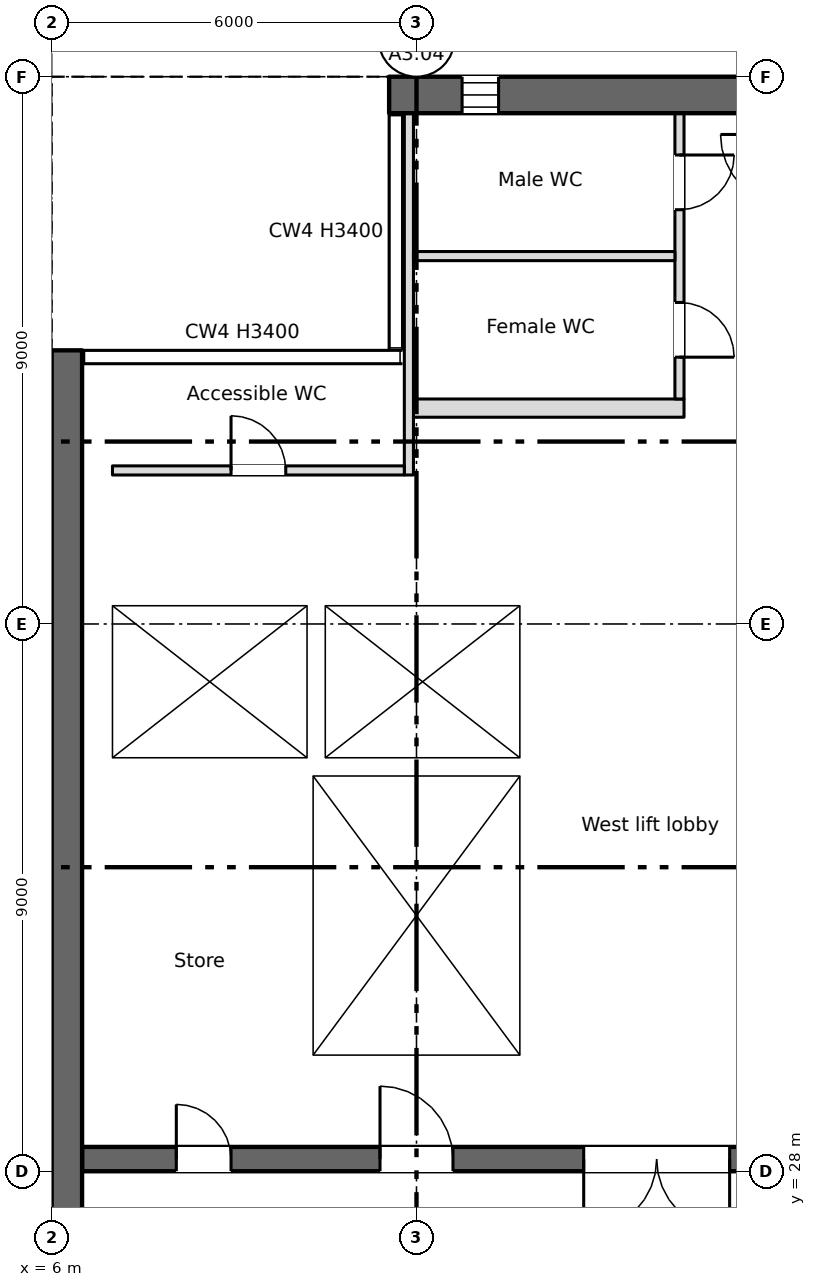
"""IFC4 building model, lengths in metres.
Left out: names, types, materials, properties, quantities, classifications, styles, units other than length and angle.
Written with IfcOpenShell. Run it as: python <this file> out.ifc"""

import sys

from ifc_helpers import new_model, si_unit, direction, frame, frame_2d, origin, place, context, subcontext, project, spatial, rectangle, extrude, element, fill, save


model = new_model("IFC4")
c1 = context("Model", 3, precision=1e-05, world=origin(), true_north=direction((0.0, 1.0)))
c2 = subcontext(c1, "Body", "Model", "MODEL_VIEW")
j1 = project(units=[si_unit("LENGTHUNIT", "METRE"), si_unit("PLANEANGLEUNIT", "RADIAN")], contexts=[c1])
p1 = place(None, origin())
s1 = spatial("IfcSite", under=j1, at=p1, CompositionType="ELEMENT")
p2 = place(p1, origin())
s2 = spatial("IfcBuilding", under=s1, at=p2, CompositionType="ELEMENT")
p3 = place(p2, frame((0.0, 0.0, 243.15)))
s3 = spatial("IfcBuildingStorey", under=s2, at=p3, CompositionType="ELEMENT", Elevation=243.15)
p4 = place(p3, frame((6.25, 8.5, 0.0), z_axis=(0.0, 0.0, 1.0), x_axis=(0.0, 1.0, 0.0)))
e1 = element("IfcWall", 1, at=p4, inside=s3, PredefinedType="SHEAR", context=c2, shape_type="SweptSolid", body=[
    extrude(rectangle(XDim=33.0, YDim=0.5, at=frame_2d((16.5, 0.0))), origin(), (0.0, 0.0, 1.0), 3.4),
])
p5 = place(p4, frame((1.2, 0.0, 0.6)))
e2 = element("IfcOpeningElement", 2, at=p5, cuts=e1, PredefinedType="OPENING", context=c2, shape_type="SweptSolid", body=[
    extrude(rectangle(XDim=0.6, YDim=2.4, at=frame_2d((0.3, 1.2))), frame((0.0, 0.26, 0.0), z_axis=(0.0, -1.0, 0.0), x_axis=(1.0, 0.0, 0.0)), (0.0, 0.0, 1.0), 0.52),
])
p6 = place(p4, frame((7.2, 0.0, 0.6)))
e3 = element("IfcOpeningElement", 3, at=p6, cuts=e1, PredefinedType="OPENING", context=c2, shape_type="SweptSolid", body=[
    extrude(rectangle(XDim=0.6, YDim=2.4, at=frame_2d((0.3, 1.2))), frame((0.0, 0.26, 0.0), z_axis=(0.0, -1.0, 0.0), x_axis=(1.0, 0.0, 0.0)), (0.0, 0.0, 1.0), 0.52),
])
p7 = place(p4, frame((13.2, 0.0, 0.6)))
e4 = element("IfcOpeningElement", 4, at=p7, cuts=e1, PredefinedType="OPENING", context=c2, shape_type="SweptSolid", body=[
    extrude(rectangle(XDim=0.6, YDim=2.4, at=frame_2d((0.3, 1.2))), frame((0.0, 0.26, 0.0), z_axis=(0.0, -1.0, 0.0), x_axis=(1.0, 0.0, 0.0)), (0.0, 0.0, 1.0), 0.52),
])
p8 = place(p3, frame((11.55, 45.7, 0.0), z_axis=(0.0, 0.0, 1.0), x_axis=(1.0, 0.0, 0.0)))
e5 = element("IfcWall", 5, at=p8, inside=s3, PredefinedType="SHEAR", context=c2, shape_type="SweptSolid", body=[
    extrude(rectangle(XDim=48.9, YDim=0.6, at=frame_2d((24.45, 0.0))), origin(), (0.0, 0.0, 1.0), 3.4),
])
p9 = place(p8, frame((1.2, 0.0, 0.6)))
e6 = element("IfcOpeningElement", 6, at=p9, cuts=e5, PredefinedType="OPENING", context=c2, shape_type="SweptSolid", body=[
    extrude(rectangle(XDim=0.6, YDim=2.4, at=frame_2d((0.3, 1.2))), frame((0.0, 0.31, 0.0), z_axis=(0.0, -1.0, 0.0), x_axis=(1.0, 0.0, 0.0)), (0.0, 0.0, 1.0), 0.62),
])
p10 = place(p3, frame((6.5, 28.2, 0.0), z_axis=(0.0, 0.0, 1.0), x_axis=(1.0, 0.0, 0.0)))
e7 = element("IfcWall", 7, at=p10, inside=s3, PredefinedType="SHEAR", context=c2, shape_type="SweptSolid", body=[
    extrude(rectangle(XDim=58.0, YDim=0.4, at=frame_2d((29.0, 0.0))), origin(), (0.0, 0.0, 1.0), 3.4),
])
p11 = place(p10, frame((14.05, 0.0, 0.0)))
e8 = element("IfcOpeningElement", 8, at=p11, cuts=e7, PredefinedType="OPENING", context=c2, shape_type="SweptSolid", body=[
    extrude(rectangle(XDim=0.9, YDim=2.1, at=frame_2d((0.45, 1.05))), frame((0.0, 0.21, 0.0), z_axis=(0.0, -1.0, 0.0), x_axis=(1.0, 0.0, 0.0)), (0.0, 0.0, 1.0), 0.42),
])
p12 = place(p10, frame((48.762, 0.0, 0.0)))
e9 = element("IfcOpeningElement", 9, at=p12, cuts=e7, PredefinedType="OPENING", context=c2, shape_type="SweptSolid", body=[
    extrude(rectangle(XDim=0.9, YDim=2.1, at=frame_2d((0.45, 1.05))), frame((0.0, 0.21, 0.0), z_axis=(0.0, -1.0, 0.0), x_axis=(1.0, 0.0, 0.0)), (0.0, 0.0, 1.0), 0.42),
])
p13 = place(p10, frame((51.337, 0.0, 0.0)))
e10 = element("IfcOpeningElement", 10, at=p13, cuts=e7, PredefinedType="OPENING", context=c2, shape_type="SweptSolid", body=[
    extrude(rectangle(XDim=0.9, YDim=2.1, at=frame_2d((0.45, 1.05))), frame((0.0, 0.21, 0.0), z_axis=(0.0, -1.0, 0.0), x_axis=(1.0, 0.0, 0.0)), (0.0, 0.0, 1.0), 0.42),
])
p14 = place(p10, frame((1.55, 0.0, 0.0)))
e11 = element("IfcOpeningElement", 11, at=p14, cuts=e7, PredefinedType="OPENING", context=c2, shape_type="SweptSolid", body=[
    extrude(rectangle(XDim=0.9, YDim=2.1, at=frame_2d((0.45, 1.05))), frame((0.0, 0.21, 0.0), z_axis=(0.0, -1.0, 0.0), x_axis=(1.0, 0.0, 0.0)), (0.0, 0.0, 1.0), 0.42),
])
p15 = place(p10, frame((4.9, 0.0, 0.0)))
e12 = element("IfcOpeningElement", 12, at=p15, cuts=e7, PredefinedType="OPENING", context=c2, shape_type="SweptSolid", body=[
    extrude(rectangle(XDim=1.2, YDim=2.1, at=frame_2d((0.6, 1.05))), frame((0.0, 0.21, 0.0), z_axis=(0.0, -1.0, 0.0), x_axis=(1.0, 0.0, 0.0)), (0.0, 0.0, 1.0), 0.42),
])
p16 = place(p10, frame((31.9, 0.0, 0.0)))
e13 = element("IfcOpeningElement", 13, at=p16, cuts=e7, PredefinedType="OPENING", context=c2, shape_type="SweptSolid", body=[
    extrude(rectangle(XDim=1.2, YDim=2.1, at=frame_2d((0.6, 1.05))), frame((0.0, 0.21, 0.0), z_axis=(0.0, -1.0, 0.0), x_axis=(1.0, 0.0, 0.0)), (0.0, 0.0, 1.0), 0.42),
])
p17 = place(p10, frame((55.4, 0.0, 0.0)))
e14 = element("IfcOpeningElement", 14, at=p17, cuts=e7, PredefinedType="OPENING", context=c2, shape_type="SweptSolid", body=[
    extrude(rectangle(XDim=1.2, YDim=2.1, at=frame_2d((0.6, 1.05))), frame((0.0, 0.21, 0.0), z_axis=(0.0, -1.0, 0.0), x_axis=(1.0, 0.0, 0.0)), (0.0, 0.0, 1.0), 0.42),
])
p18 = place(p10, frame((21.9, 0.0, 0.0)))
e15 = element("IfcOpeningElement", 15, at=p18, cuts=e7, PredefinedType="OPENING", context=c2, shape_type="SweptSolid", body=[
    extrude(rectangle(XDim=1.2, YDim=2.1, at=frame_2d((0.6, 1.05))), frame((0.0, 0.21, 0.0), z_axis=(0.0, -1.0, 0.0), x_axis=(1.0, 0.0, 0.0)), (0.0, 0.0, 1.0), 0.42),
])
p19 = place(p10, frame((41.9, 0.0, 0.0)))
e16 = element("IfcOpeningElement", 16, at=p19, cuts=e7, PredefinedType="OPENING", context=c2, shape_type="SweptSolid", body=[
    extrude(rectangle(XDim=1.2, YDim=2.1, at=frame_2d((0.6, 1.05))), frame((0.0, 0.21, 0.0), z_axis=(0.0, -1.0, 0.0), x_axis=(1.0, 0.0, 0.0)), (0.0, 0.0, 1.0), 0.42),
])
p20 = place(p10, frame((25.05, 0.0, 0.0)))
e17 = element("IfcOpeningElement", 17, at=p20, cuts=e7, PredefinedType="OPENING", context=c2, shape_type="SweptSolid", body=[
    extrude(rectangle(XDim=2.4, YDim=2.1, at=frame_2d((1.2, 1.05))), frame((0.0, 0.21, 0.0), z_axis=(0.0, -1.0, 0.0), x_axis=(1.0, 0.0, 0.0)), (0.0, 0.0, 1.0), 0.42),
])
p21 = place(p10, frame((37.55, 0.0, 0.0)))
e18 = element("IfcOpeningElement", 18, at=p21, cuts=e7, PredefinedType="OPENING", context=c2, shape_type="SweptSolid", body=[
    extrude(rectangle(XDim=2.4, YDim=2.1, at=frame_2d((1.2, 1.05))), frame((0.0, 0.21, 0.0), z_axis=(0.0, -1.0, 0.0), x_axis=(1.0, 0.0, 0.0)), (0.0, 0.0, 1.0), 0.42),
])
p22 = place(p10, frame((8.25, 0.0, 0.0)))
e19 = element("IfcOpeningElement", 19, at=p22, cuts=e7, PredefinedType="OPENING", context=c2, shape_type="SweptSolid", body=[
    extrude(rectangle(XDim=2.4, YDim=2.1, at=frame_2d((1.2, 1.05))), frame((0.0, 0.21, 0.0), z_axis=(0.0, -1.0, 0.0), x_axis=(1.0, 0.0, 0.0)), (0.0, 0.0, 1.0), 0.42),
])
p23 = place(p10, frame((29.05, 0.0, 0.0)))
e20 = element("IfcOpeningElement", 20, at=p23, cuts=e7, PredefinedType="OPENING", context=c2, shape_type="SweptSolid", body=[
    extrude(rectangle(XDim=0.9, YDim=2.1, at=frame_2d((0.45, 1.05))), frame((0.0, 0.21, 0.0), z_axis=(0.0, -1.0, 0.0), x_axis=(1.0, 0.0, 0.0)), (0.0, 0.0, 1.0), 0.42),
])
p24 = place(p10, frame((35.05, 0.0, 0.0)))
e21 = element("IfcOpeningElement", 21, at=p24, cuts=e7, PredefinedType="OPENING", context=c2, shape_type="SweptSolid", body=[
    extrude(rectangle(XDim=0.9, YDim=2.1, at=frame_2d((0.45, 1.05))), frame((0.0, 0.21, 0.0), z_axis=(0.0, -1.0, 0.0), x_axis=(1.0, 0.0, 0.0)), (0.0, 0.0, 1.0), 0.42),
])
p25 = place(p3, frame((6.75, 28.4, 0.0), z_axis=(0.0, 0.0, 1.0), x_axis=(0.0, 1.0, 0.0)))
e22 = element("IfcWall", 22, at=p25, inside=s3, PredefinedType="SHEAR", context=c2, shape_type="SweptSolid", body=[
    extrude(rectangle(XDim=12.85, YDim=0.5, at=frame_2d((6.425, 0.0))), origin(), (0.0, 0.0, 1.0), 3.4),
])
for number, where, z_axis, x_axis in (
    (23, (10.15, 28.4, 0.0), (0.0, 0.0, 1.0), (0.0, 1.0, 0.0)),
    (24, (13.85, 28.4, 0.0), (0.0, 0.0, 1.0), (0.0, 1.0, 0.0)),
):
    element("IfcWall", number, at=place(p3, frame(where, z_axis=z_axis, x_axis=x_axis)), inside=s3, PredefinedType="SHEAR", context=c2, shape_type="SweptSolid", body=[
        extrude(rectangle(XDim=6.1, YDim=0.3, at=frame_2d((3.05, 0.0))), origin(), (0.0, 0.0, 1.0), 3.4),
    ])
p26 = place(p3, frame((7.0, 34.65, 0.0), z_axis=(0.0, 0.0, 1.0), x_axis=(1.0, 0.0, 0.0)))
e25 = element("IfcWall", 25, at=p26, inside=s3, PredefinedType="SHEAR", context=c2, shape_type="SweptSolid", body=[
    extrude(rectangle(XDim=7.0, YDim=0.3, at=frame_2d((3.5, 0.0))), origin(), (0.0, 0.0, 1.0), 3.4),
])
p27 = place(p3, frame((7.0, 37.45, 0.0), z_axis=(0.0, 0.0, 1.0), x_axis=(1.0, 0.0, 0.0)))
e26 = element("IfcWall", 26, at=p27, inside=s3, PredefinedType="SHEAR", context=c2, shape_type="SweptSolid", body=[
    extrude(rectangle(XDim=7.0, YDim=0.3, at=frame_2d((3.5, 0.0))), origin(), (0.0, 0.0, 1.0), 3.4),
])
p28 = place(p27, frame((1.05, 0.0, 0.0)))
e27 = element("IfcOpeningElement", 27, at=p28, cuts=e26, PredefinedType="OPENING", context=c2, shape_type="SweptSolid", body=[
    extrude(rectangle(XDim=1.1, YDim=2.1, at=frame_2d((0.55, 1.05))), frame((0.0, 0.16, 0.0), z_axis=(0.0, -1.0, 0.0), x_axis=(1.0, 0.0, 0.0)), (0.0, 0.0, 1.0), 0.32),
])
p29 = place(p27, frame((4.55, 0.0, 0.0)))
e28 = element("IfcOpeningElement", 28, at=p29, cuts=e26, PredefinedType="OPENING", context=c2, shape_type="SweptSolid", body=[
    extrude(rectangle(XDim=1.1, YDim=2.1, at=frame_2d((0.55, 1.05))), frame((0.0, 0.16, 0.0), z_axis=(0.0, -1.0, 0.0), x_axis=(1.0, 0.0, 0.0)), (0.0, 0.0, 1.0), 0.32),
])
p30 = place(p3, frame((13.85, 34.8, 0.0), z_axis=(0.0, 0.0, 1.0), x_axis=(0.0, 1.0, 0.0)))
e29 = element("IfcWall", 29, at=p30, inside=s3, PredefinedType="SHEAR", context=c2, shape_type="SweptSolid", body=[
    extrude(rectangle(XDim=2.5, YDim=0.3, at=frame_2d((1.25, 0.0))), origin(), (0.0, 0.0, 1.0), 3.4),
])
p31 = place(p3, frame((11.95, 40.55, 0.0), z_axis=(0.0, 0.0, 1.0), x_axis=(1.0, 0.0, 0.0)))
e30 = element("IfcWall", 30, at=p31, inside=s3, PredefinedType="PARTITIONING", context=c2, shape_type="SweptSolid", body=[
    extrude(rectangle(XDim=4.45, YDim=0.3, at=frame_2d((2.225, 0.0))), origin(), (0.0, 0.0, 1.0), 3.4),
])
p32 = place(p3, frame((10.35, 34.8, 0.0), z_axis=(0.0, 0.0, 1.0), x_axis=(0.0, 1.0, 0.0)))
e31 = element("IfcWall", 31, at=p32, inside=s3, PredefinedType="SHEAR", context=c2, shape_type="SweptSolid", body=[
    extrude(rectangle(XDim=2.5, YDim=0.3, at=frame_2d((1.25, 0.0))), origin(), (0.0, 0.0, 1.0), 3.4),
])
p33 = place(p3, frame((16.325, 45.4, 0.0), z_axis=(0.0, 0.0, 1.0), x_axis=(0.0, -1.0, 0.0)))
e32 = element("IfcWall", 32, at=p33, inside=s3, PredefinedType="PARTITIONING", context=c2, shape_type="SweptSolid", body=[
    extrude(rectangle(XDim=4.7, YDim=0.15, at=frame_2d((2.35, 0.0))), origin(), (0.0, 0.0, 1.0), 3.4),
])
p34 = place(p33, frame((3.113, 0.0, 0.0)))
e33 = element("IfcOpeningElement", 33, at=p34, cuts=e32, PredefinedType="OPENING", context=c2, shape_type="SweptSolid", body=[
    extrude(rectangle(XDim=0.9, YDim=2.1, at=frame_2d((0.45, 1.05))), frame((0.0, 0.085, 0.0), z_axis=(0.0, -1.0, 0.0), x_axis=(1.0, 0.0, 0.0)), (0.0, 0.0, 1.0), 0.17),
])
p35 = place(p33, frame((0.688, 0.0, 0.0)))
e34 = element("IfcOpeningElement", 34, at=p35, cuts=e32, PredefinedType="OPENING", context=c2, shape_type="SweptSolid", body=[
    extrude(rectangle(XDim=0.9, YDim=2.1, at=frame_2d((0.45, 1.05))), frame((0.0, 0.085, 0.0), z_axis=(0.0, -1.0, 0.0), x_axis=(1.0, 0.0, 0.0)), (0.0, 0.0, 1.0), 0.17),
])
p36 = place(p3, frame((11.875, 39.45, 0.0), z_axis=(0.0, 0.0, 1.0), x_axis=(0.0, 1.0, 0.0)))
e35 = element("IfcWall", 35, at=p36, inside=s3, PredefinedType="PARTITIONING", context=c2, shape_type="SweptSolid", body=[
    extrude(rectangle(XDim=5.95, YDim=0.15, at=frame_2d((2.975, 0.0))), origin(), (0.0, 0.0, 1.0), 3.4),
])
p37 = place(p3, frame((7.0, 39.525, 0.0), z_axis=(0.0, 0.0, 1.0), x_axis=(1.0, 0.0, 0.0)))
e36 = element("IfcWall", 36, at=p37, inside=s3, PredefinedType="PARTITIONING", context=c2, shape_type="SweptSolid", body=[
    extrude(rectangle(XDim=4.8, YDim=0.15, at=frame_2d((2.4, 0.0))), origin(), (0.0, 0.0, 1.0), 3.4),
])
p38 = place(p37, frame((1.95, 0.0, 0.0)))
e37 = element("IfcOpeningElement", 37, at=p38, cuts=e36, PredefinedType="OPENING", context=c2, shape_type="SweptSolid", body=[
    extrude(rectangle(XDim=0.9, YDim=2.1, at=frame_2d((0.45, 1.05))), frame((0.0, 0.085, 0.0), z_axis=(0.0, -1.0, 0.0), x_axis=(1.0, 0.0, 0.0)), (0.0, 0.0, 1.0), 0.17),
])
p39 = place(p3, frame((11.95, 43.05, 0.0), z_axis=(0.0, 0.0, 1.0), x_axis=(1.0, 0.0, 0.0)))
e38 = element("IfcWall", 38, at=p39, inside=s3, PredefinedType="PARTITIONING", context=c2, shape_type="SweptSolid", body=[
    extrude(rectangle(XDim=4.3, YDim=0.15, at=frame_2d((2.15, 0.0))), origin(), (0.0, 0.0, 1.0), 3.4),
])
p40 = place(p9, origin())
e39 = element("IfcWindow", 39, at=p40, inside=s3, PartitioningType="SINGLE_PANEL", PredefinedType="WINDOW", context=c2, shape_type="SweptSolid", body=[
    extrude(rectangle(XDim=0.6, YDim=2.4, at=frame_2d((0.3, 1.2))), frame((0.0, 0.03, 0.0), z_axis=(0.0, -1.0, 0.0), x_axis=(1.0, 0.0, 0.0)), (0.0, 0.0, 1.0), 0.06),
])
fill(e6, e39)
p41 = place(p14, origin())
e40 = element("IfcDoor", 40, at=p41, inside=s3, OperationType="SINGLE_SWING_LEFT", PredefinedType="DOOR", context=c2, shape_type="SweptSolid", body=[
    extrude(rectangle(XDim=0.9, YDim=2.1, at=frame_2d((0.45, 1.05))), frame((0.0, 0.025, 0.0), z_axis=(0.0, -1.0, 0.0), x_axis=(1.0, 0.0, 0.0)), (0.0, 0.0, 1.0), 0.05),
])
fill(e11, e40)
p42 = place(p38, origin())
e41 = element("IfcDoor", 41, at=p42, inside=s3, OperationType="SINGLE_SWING_LEFT", PredefinedType="DOOR", context=c2, shape_type="SweptSolid", body=[
    extrude(rectangle(XDim=0.9, YDim=2.1, at=frame_2d((0.45, 1.05))), frame((0.0, 0.025, 0.0), z_axis=(0.0, -1.0, 0.0), x_axis=(1.0, 0.0, 0.0)), (0.0, 0.0, 1.0), 0.05),
])
fill(e37, e41)
p43 = place(p34, origin())
e42 = element("IfcDoor", 42, at=p43, inside=s3, OperationType="SINGLE_SWING_RIGHT", PredefinedType="DOOR", context=c2, shape_type="SweptSolid", body=[
    extrude(rectangle(XDim=0.9, YDim=2.1, at=frame_2d((0.45, 1.05))), frame((0.0, 0.025, 0.0), z_axis=(0.0, -1.0, 0.0), x_axis=(1.0, 0.0, 0.0)), (0.0, 0.0, 1.0), 0.05),
])
fill(e33, e42)
p44 = place(p35, origin())
e43 = element("IfcDoor", 43, at=p44, inside=s3, OperationType="SINGLE_SWING_LEFT", PredefinedType="DOOR", context=c2, shape_type="SweptSolid", body=[
    extrude(rectangle(XDim=0.9, YDim=2.1, at=frame_2d((0.45, 1.05))), frame((0.0, 0.025, 0.0), z_axis=(0.0, -1.0, 0.0), x_axis=(1.0, 0.0, 0.0)), (0.0, 0.0, 1.0), 0.05),
])
fill(e34, e43)
p45 = place(p28, origin())
e44 = element("IfcDoor", 44, at=p45, inside=s3, OperationType="SLIDING_TO_LEFT", PredefinedType="DOOR", context=c2, shape_type="SweptSolid", body=[
    extrude(rectangle(XDim=1.1, YDim=2.1, at=frame_2d((0.55, 1.05))), frame((0.0, 0.025, 0.0), z_axis=(0.0, -1.0, 0.0), x_axis=(1.0, 0.0, 0.0)), (0.0, 0.0, 1.0), 0.05),
])
fill(e27, e44)
p46 = place(p29, origin())
e45 = element("IfcDoor", 45, at=p46, inside=s3, OperationType="SLIDING_TO_LEFT", PredefinedType="DOOR", context=c2, shape_type="SweptSolid", body=[
    extrude(rectangle(XDim=1.1, YDim=2.1, at=frame_2d((0.55, 1.05))), frame((0.0, 0.025, 0.0), z_axis=(0.0, -1.0, 0.0), x_axis=(1.0, 0.0, 0.0)), (0.0, 0.0, 1.0), 0.05),
])
fill(e28, e45)
p47 = place(p15, origin())
e46 = element("IfcDoor", 46, at=p47, inside=s3, OperationType="SINGLE_SWING_LEFT", PredefinedType="DOOR", context=c2, shape_type="SweptSolid", body=[
    extrude(rectangle(XDim=1.2, YDim=2.1, at=frame_2d((0.6, 1.05))), frame((0.0, 0.025, 0.0), z_axis=(0.0, -1.0, 0.0), x_axis=(1.0, 0.0, 0.0)), (0.0, 0.0, 1.0), 0.05),
])
fill(e12, e46)
p48 = place(p22, origin())
e47 = element("IfcDoor", 47, at=p48, inside=s3, OperationType="DOUBLE_DOOR_SINGLE_SWING", PredefinedType="DOOR", context=c2, shape_type="SweptSolid", body=[
    extrude(rectangle(XDim=2.4, YDim=2.1, at=frame_2d((1.2, 1.05))), frame((0.0, 0.025, 0.0), z_axis=(0.0, -1.0, 0.0), x_axis=(1.0, 0.0, 0.0)), (0.0, 0.0, 1.0), 0.05),
])
fill(e19, e47)
save(model, sys.argv[1])
